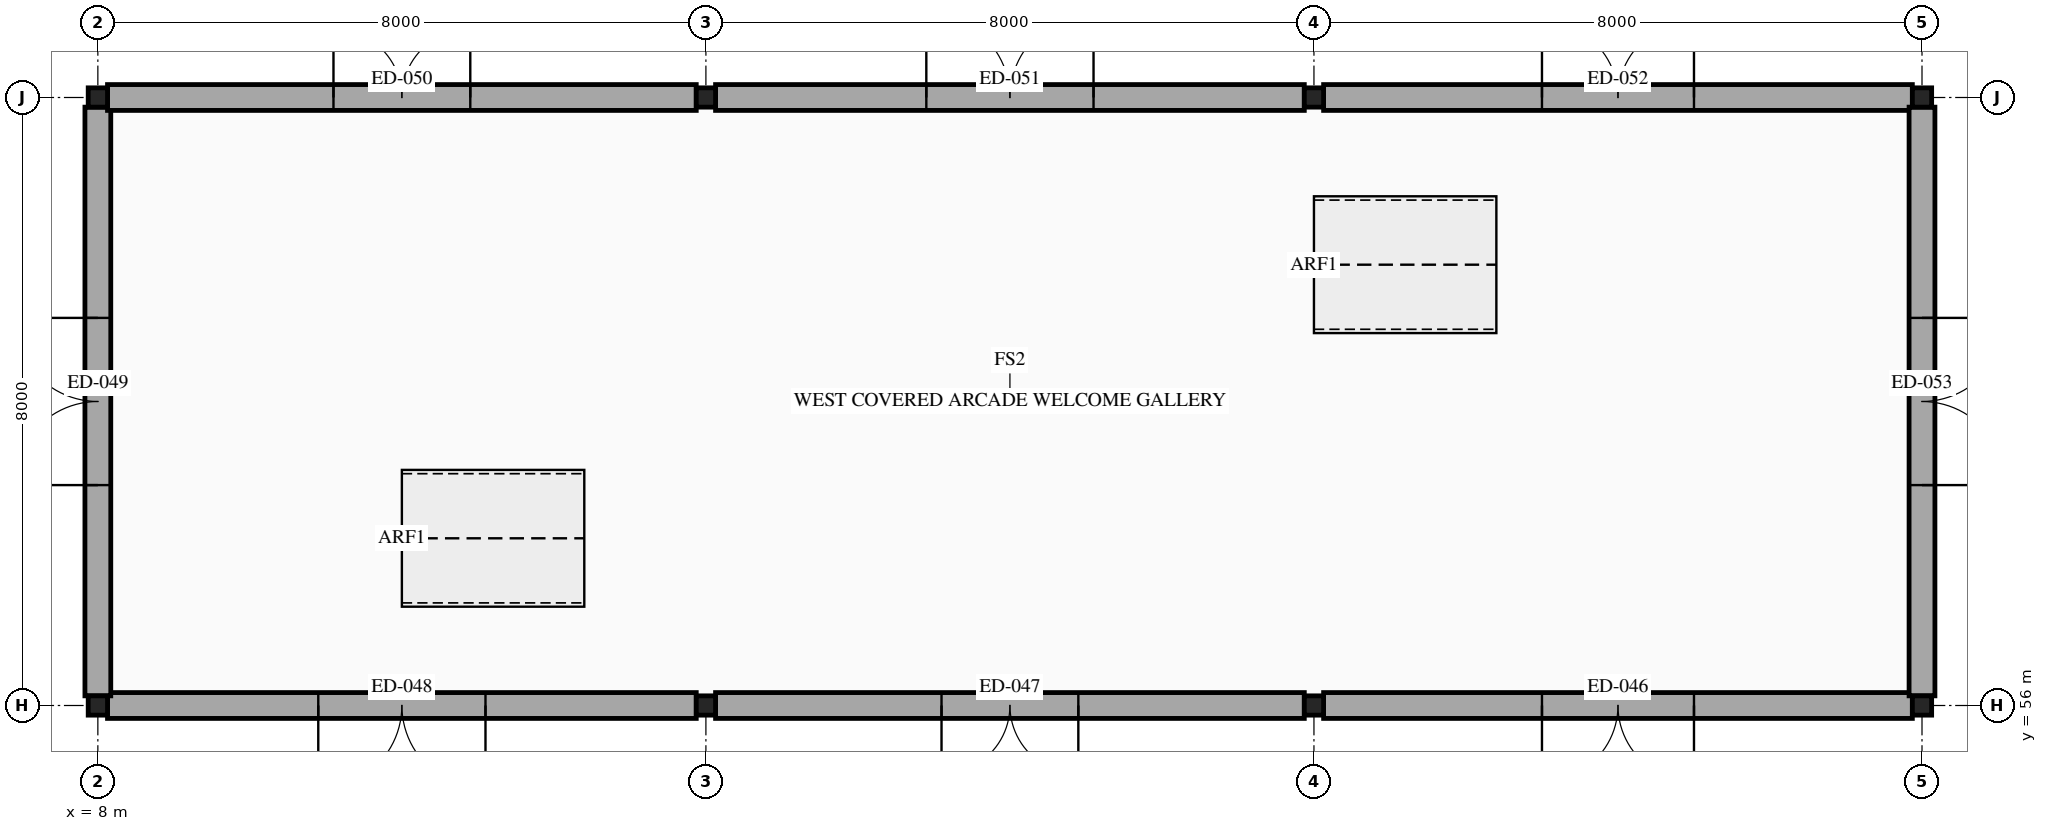
"""IFC4 building model, lengths in metres.
Left out: names, types, materials, properties, quantities, classifications, styles, units other than length and angle.
Written with IfcOpenShell. Run it as: python <this file> out.ifc"""

import sys

from ifc_helpers import new_model, si_unit, direction, frame, frame_2d, origin, origin_2d, place, context, subcontext, project, spatial, rectangle, hollow_rectangle, extrude, element, fill, save


model = new_model("IFC4")
c1 = context("Model", 3, precision=1e-05, world=origin(), true_north=direction((0.0, 1.0)))
c2 = subcontext(c1, "Body", "Model", "MODEL_VIEW")
j1 = project(units=[si_unit("LENGTHUNIT", "METRE"), si_unit("PLANEANGLEUNIT", "RADIAN")], contexts=[c1])
p1 = place(None, origin())
s1 = spatial("IfcSite", under=j1, at=p1, CompositionType="ELEMENT")
p2 = place(p1, origin())
s2 = spatial("IfcBuilding", under=s1, at=p2, CompositionType="ELEMENT")
p3 = place(p2, origin())
s3 = spatial("IfcBuildingStorey", under=s2, at=p3, CompositionType="ELEMENT", Elevation=0.0)
for number, where, z_axis, x_axis in (
    (1, (8.0, 56.0, 0.0), (0.0, 0.0, 1.0), (1.0, 0.0, 0.0)),
    (2, (8.0, 64.0, 0.0), (0.0, 0.0, 1.0), (1.0, 0.0, 0.0)),
    (3, (16.0, 56.0, 0.0), (0.0, 0.0, 1.0), (1.0, 0.0, 0.0)),
    (4, (16.0, 64.0, 0.0), (0.0, 0.0, 1.0), (1.0, 0.0, 0.0)),
    (5, (24.0, 56.0, 0.0), (0.0, 0.0, 1.0), (1.0, 0.0, 0.0)),
    (6, (24.0, 64.0, 0.0), (0.0, 0.0, 1.0), (1.0, 0.0, 0.0)),
    (7, (32.0, 56.0, 0.0), (0.0, 0.0, 1.0), (1.0, 0.0, 0.0)),
    (8, (32.0, 64.0, 0.0), (0.0, 0.0, 1.0), (1.0, 0.0, 0.0)),
):
    element("IfcColumn", number, at=place(p3, frame(where, z_axis=z_axis, x_axis=x_axis)), inside=s3, PredefinedType="COLUMN", context=c2, shape_type="SweptSolid", body=[
        extrude(hollow_rectangle(XDim=0.254, YDim=0.254, WallThickness=0.009, InnerFilletRadius=0.009, OuterFilletRadius=0.018, at=origin_2d()), origin(), (0.0, 0.0, 1.0), 5.6),
    ])
p4 = place(p3, frame((31.873, 56.0, 0.0), z_axis=(0.0, 0.0, 1.0), x_axis=(-1.0, 0.0, 0.0)))
e9 = element("IfcWall", 9, at=p4, inside=s3, PredefinedType="STANDARD", context=c2, shape_type="SweptSolid", body=[
    extrude(rectangle(XDim=7.746, YDim=0.34, at=frame_2d((3.873, 0.0))), origin(), (0.0, 0.0, 1.0), 4.58),
])
p5 = place(p4, frame((2.873, 0.0, 0.0)))
e10 = element("IfcOpeningElement", 10, at=p5, cuts=e9, PredefinedType="OPENING", context=c2, shape_type="SweptSolid", body=[
    extrude(rectangle(XDim=2.0, YDim=2.35, at=frame_2d((1.0, 1.175))), frame((0.0, 0.18, 0.0), z_axis=(0.0, -1.0, 0.0), x_axis=(1.0, 0.0, 0.0)), (0.0, 0.0, 1.0), 0.36),
])
p6 = place(p3, frame((23.873, 56.0, 0.0), z_axis=(0.0, 0.0, 1.0), x_axis=(-1.0, 0.0, 0.0)))
e11 = element("IfcWall", 11, at=p6, inside=s3, PredefinedType="STANDARD", context=c2, shape_type="SweptSolid", body=[
    extrude(rectangle(XDim=7.746, YDim=0.34, at=frame_2d((3.873, 0.0))), origin(), (0.0, 0.0, 1.0), 4.58),
])
p7 = place(p6, frame((2.973, 0.0, 0.0)))
e12 = element("IfcOpeningElement", 12, at=p7, cuts=e11, PredefinedType="OPENING", context=c2, shape_type="SweptSolid", body=[
    extrude(rectangle(XDim=1.8, YDim=2.3, at=frame_2d((0.9, 1.15))), frame((0.0, 0.18, 0.0), z_axis=(0.0, -1.0, 0.0), x_axis=(1.0, 0.0, 0.0)), (0.0, 0.0, 1.0), 0.36),
])
p8 = place(p3, frame((15.873, 56.0, 0.0), z_axis=(0.0, 0.0, 1.0), x_axis=(-1.0, 0.0, 0.0)))
e13 = element("IfcWall", 13, at=p8, inside=s3, PredefinedType="STANDARD", context=c2, shape_type="SweptSolid", body=[
    extrude(rectangle(XDim=7.746, YDim=0.34, at=frame_2d((3.873, 0.0))), origin(), (0.0, 0.0, 1.0), 4.58),
])
p9 = place(p8, frame((2.773, 0.0, 0.0)))
e14 = element("IfcOpeningElement", 14, at=p9, cuts=e13, PredefinedType="OPENING", context=c2, shape_type="SweptSolid", body=[
    extrude(rectangle(XDim=2.2, YDim=2.45, at=frame_2d((1.1, 1.225))), frame((0.0, 0.18, 0.0), z_axis=(0.0, -1.0, 0.0), x_axis=(1.0, 0.0, 0.0)), (0.0, 0.0, 1.0), 0.36),
])
p10 = place(p3, frame((8.0, 56.127, 0.0), z_axis=(0.0, 0.0, 1.0), x_axis=(0.0, 1.0, 0.0)))
e15 = element("IfcWall", 15, at=p10, inside=s3, PredefinedType="STANDARD", context=c2, shape_type="SweptSolid", body=[
    extrude(rectangle(XDim=7.746, YDim=0.34, at=frame_2d((3.873, 0.0))), origin(), (0.0, 0.0, 1.0), 4.58),
])
p11 = place(p10, frame((2.773, 0.0, 0.0)))
e16 = element("IfcOpeningElement", 16, at=p11, cuts=e15, PredefinedType="OPENING", context=c2, shape_type="SweptSolid", body=[
    extrude(rectangle(XDim=2.2, YDim=2.45, at=frame_2d((1.1, 1.225))), frame((0.0, 0.18, 0.0), z_axis=(0.0, -1.0, 0.0), x_axis=(1.0, 0.0, 0.0)), (0.0, 0.0, 1.0), 0.36),
])
p12 = place(p3, frame((8.127, 64.0, 0.0), z_axis=(0.0, 0.0, 1.0), x_axis=(1.0, 0.0, 0.0)))
e17 = element("IfcWall", 17, at=p12, inside=s3, PredefinedType="STANDARD", context=c2, shape_type="SweptSolid", body=[
    extrude(rectangle(XDim=7.746, YDim=0.34, at=frame_2d((3.873, 0.0))), origin(), (0.0, 0.0, 1.0), 4.58),
])
p13 = place(p12, frame((2.973, 0.0, 0.0)))
e18 = element("IfcOpeningElement", 18, at=p13, cuts=e17, PredefinedType="OPENING", context=c2, shape_type="SweptSolid", body=[
    extrude(rectangle(XDim=1.8, YDim=2.3, at=frame_2d((0.9, 1.15))), frame((0.0, 0.18, 0.0), z_axis=(0.0, -1.0, 0.0), x_axis=(1.0, 0.0, 0.0)), (0.0, 0.0, 1.0), 0.36),
])
p14 = place(p3, frame((16.127, 64.0, 0.0), z_axis=(0.0, 0.0, 1.0), x_axis=(1.0, 0.0, 0.0)))
e19 = element("IfcWall", 19, at=p14, inside=s3, PredefinedType="STANDARD", context=c2, shape_type="SweptSolid", body=[
    extrude(rectangle(XDim=7.746, YDim=0.34, at=frame_2d((3.873, 0.0))), origin(), (0.0, 0.0, 1.0), 4.58),
])
p15 = place(p14, frame((2.773, 0.0, 0.0)))
e20 = element("IfcOpeningElement", 20, at=p15, cuts=e19, PredefinedType="OPENING", context=c2, shape_type="SweptSolid", body=[
    extrude(rectangle(XDim=2.2, YDim=2.45, at=frame_2d((1.1, 1.225))), frame((0.0, 0.18, 0.0), z_axis=(0.0, -1.0, 0.0), x_axis=(1.0, 0.0, 0.0)), (0.0, 0.0, 1.0), 0.36),
])
p16 = place(p3, frame((24.127, 64.0, 0.0), z_axis=(0.0, 0.0, 1.0), x_axis=(1.0, 0.0, 0.0)))
e21 = element("IfcWall", 21, at=p16, inside=s3, PredefinedType="STANDARD", context=c2, shape_type="SweptSolid", body=[
    extrude(rectangle(XDim=7.746, YDim=0.34, at=frame_2d((3.873, 0.0))), origin(), (0.0, 0.0, 1.0), 4.58),
])
p17 = place(p16, frame((2.873, 0.0, 0.0)))
e22 = element("IfcOpeningElement", 22, at=p17, cuts=e21, PredefinedType="OPENING", context=c2, shape_type="SweptSolid", body=[
    extrude(rectangle(XDim=2.0, YDim=2.35, at=frame_2d((1.0, 1.175))), frame((0.0, 0.18, 0.0), z_axis=(0.0, -1.0, 0.0), x_axis=(1.0, 0.0, 0.0)), (0.0, 0.0, 1.0), 0.36),
])
p18 = place(p3, frame((32.0, 63.873, 0.0), z_axis=(0.0, 0.0, 1.0), x_axis=(0.0, -1.0, 0.0)))
e23 = element("IfcWall", 23, at=p18, inside=s3, PredefinedType="STANDARD", context=c2, shape_type="SweptSolid", body=[
    extrude(rectangle(XDim=7.746, YDim=0.34, at=frame_2d((3.873, 0.0))), origin(), (0.0, 0.0, 1.0), 4.58),
])
p19 = place(p18, frame((2.773, 0.0, 0.0)))
e24 = element("IfcOpeningElement", 24, at=p19, cuts=e23, PredefinedType="OPENING", context=c2, shape_type="SweptSolid", body=[
    extrude(rectangle(XDim=2.2, YDim=2.45, at=frame_2d((1.1, 1.225))), frame((0.0, 0.18, 0.0), z_axis=(0.0, -1.0, 0.0), x_axis=(1.0, 0.0, 0.0)), (0.0, 0.0, 1.0), 0.36),
])
p20 = place(p5, origin())
e25 = element("IfcDoor", 25, at=p20, inside=s3, OperationType="DOUBLE_DOOR_SINGLE_SWING", PredefinedType="DOOR", context=c2, shape_type="SweptSolid", body=[
    extrude(rectangle(XDim=2.0, YDim=2.35, at=frame_2d((1.0, 1.175))), frame((0.0, 0.025, 0.0), z_axis=(0.0, -1.0, 0.0), x_axis=(1.0, 0.0, 0.0)), (0.0, 0.0, 1.0), 0.05),
])
fill(e10, e25)
p21 = place(p7, origin())
e26 = element("IfcDoor", 26, at=p21, inside=s3, OperationType="DOUBLE_DOOR_SINGLE_SWING", PredefinedType="DOOR", context=c2, shape_type="SweptSolid", body=[
    extrude(rectangle(XDim=1.8, YDim=2.3, at=frame_2d((0.9, 1.15))), frame((0.0, 0.025, 0.0), z_axis=(0.0, -1.0, 0.0), x_axis=(1.0, 0.0, 0.0)), (0.0, 0.0, 1.0), 0.05),
])
fill(e12, e26)
p22 = place(p9, origin())
e27 = element("IfcDoor", 27, at=p22, inside=s3, OperationType="DOUBLE_DOOR_SINGLE_SWING", PredefinedType="DOOR", context=c2, shape_type="SweptSolid", body=[
    extrude(rectangle(XDim=2.2, YDim=2.45, at=frame_2d((1.1, 1.225))), frame((0.0, 0.025, 0.0), z_axis=(0.0, -1.0, 0.0), x_axis=(1.0, 0.0, 0.0)), (0.0, 0.0, 1.0), 0.05),
])
fill(e14, e27)
p23 = place(p11, origin())
e28 = element("IfcDoor", 28, at=p23, inside=s3, OperationType="DOUBLE_DOOR_SINGLE_SWING", PredefinedType="DOOR", context=c2, shape_type="SweptSolid", body=[
    extrude(rectangle(XDim=2.2, YDim=2.45, at=frame_2d((1.1, 1.225))), frame((0.0, 0.025, 0.0), z_axis=(0.0, -1.0, 0.0), x_axis=(1.0, 0.0, 0.0)), (0.0, 0.0, 1.0), 0.05),
])
fill(e16, e28)
p24 = place(p13, origin())
e29 = element("IfcDoor", 29, at=p24, inside=s3, OperationType="DOUBLE_DOOR_SINGLE_SWING", PredefinedType="DOOR", context=c2, shape_type="SweptSolid", body=[
    extrude(rectangle(XDim=1.8, YDim=2.3, at=frame_2d((0.9, 1.15))), frame((0.0, 0.025, 0.0), z_axis=(0.0, -1.0, 0.0), x_axis=(1.0, 0.0, 0.0)), (0.0, 0.0, 1.0), 0.05),
])
fill(e18, e29)
p25 = place(p15, origin())
e30 = element("IfcDoor", 30, at=p25, inside=s3, OperationType="DOUBLE_DOOR_SINGLE_SWING", PredefinedType="DOOR", context=c2, shape_type="SweptSolid", body=[
    extrude(rectangle(XDim=2.2, YDim=2.45, at=frame_2d((1.1, 1.225))), frame((0.0, 0.025, 0.0), z_axis=(0.0, -1.0, 0.0), x_axis=(1.0, 0.0, 0.0)), (0.0, 0.0, 1.0), 0.05),
])
fill(e20, e30)
p26 = place(p17, origin())
e31 = element("IfcDoor", 31, at=p26, inside=s3, OperationType="DOUBLE_DOOR_SINGLE_SWING", PredefinedType="DOOR", context=c2, shape_type="SweptSolid", body=[
    extrude(rectangle(XDim=2.0, YDim=2.35, at=frame_2d((1.0, 1.175))), frame((0.0, 0.025, 0.0), z_axis=(0.0, -1.0, 0.0), x_axis=(1.0, 0.0, 0.0)), (0.0, 0.0, 1.0), 0.05),
])
fill(e22, e31)
p27 = place(p19, origin())
e32 = element("IfcDoor", 32, at=p27, inside=s3, OperationType="DOUBLE_DOOR_SINGLE_SWING", PredefinedType="DOOR", context=c2, shape_type="SweptSolid", body=[
    extrude(rectangle(XDim=2.2, YDim=2.45, at=frame_2d((1.1, 1.225))), frame((0.0, 0.025, 0.0), z_axis=(0.0, -1.0, 0.0), x_axis=(1.0, 0.0, 0.0)), (0.0, 0.0, 1.0), 0.05),
])
fill(e24, e32)
save(model, sys.argv[1])
